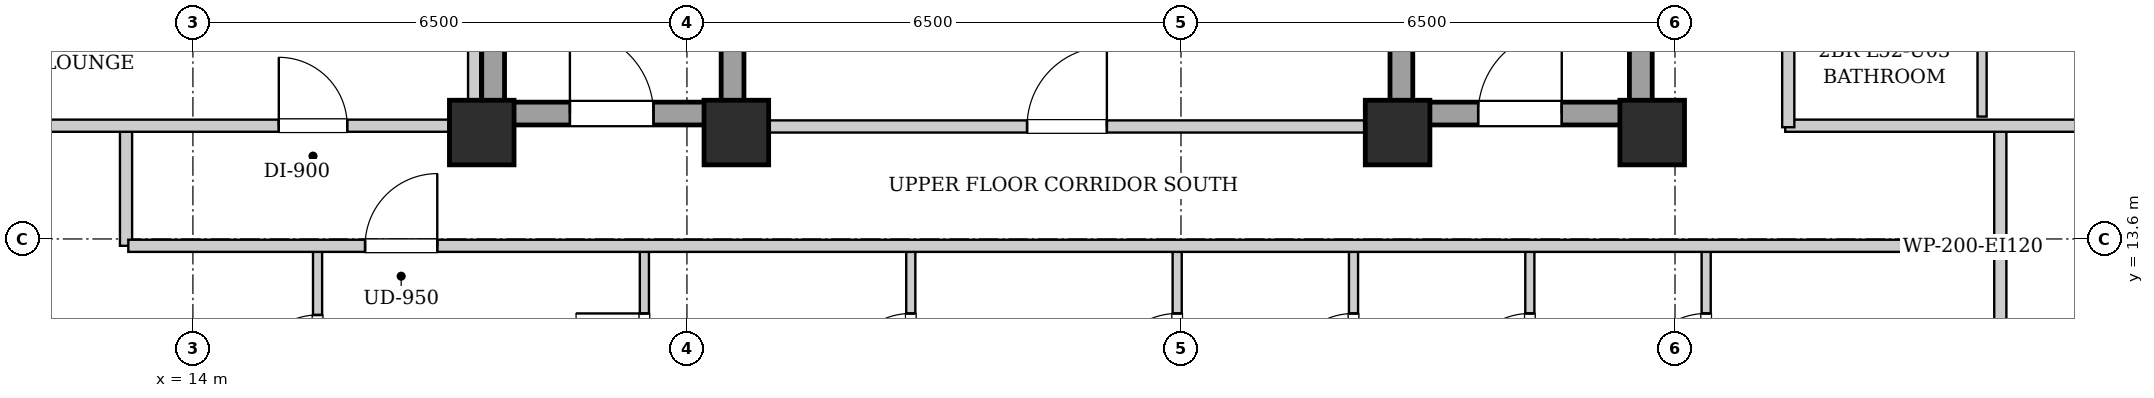
"""IFC4 building model, lengths in metres.
Left out: names, types, materials, properties, quantities, classifications, styles, units other than length and angle.
Written with IfcOpenShell. Run it as: python <this file> out.ifc"""

import sys

from ifc_helpers import new_model, si_unit, direction, frame, frame_2d, origin, origin_2d, place, context, subcontext, project, spatial, rectangle, extrude, element, fill, save


model = new_model("IFC4")
c1 = context("Model", 3, precision=1e-05, world=origin(), true_north=direction((0.0, 1.0)))
c2 = subcontext(c1, "Body", "Model", "MODEL_VIEW")
j1 = project(units=[si_unit("LENGTHUNIT", "METRE"), si_unit("PLANEANGLEUNIT", "RADIAN")], contexts=[c1])
p1 = place(None, origin())
s1 = spatial("IfcSite", under=j1, at=p1, CompositionType="ELEMENT")
p2 = place(p1, origin())
s2 = spatial("IfcBuilding", under=s1, at=p2, CompositionType="ELEMENT")
p3 = place(p2, frame((0.0, 0.0, 181.0)))
s3 = spatial("IfcBuildingStorey", under=s2, at=p3, CompositionType="ELEMENT", Elevation=181.0)
for number, where, z_axis, x_axis in (
    (1, (17.8, 15.0, 0.0), (0.0, 0.0, 1.0), (1.0, 0.0, 0.0)),
    (2, (21.15, 15.0, 0.0), (0.0, 0.0, 1.0), (1.0, 0.0, 0.0)),
    (3, (29.85, 15.0, 0.0), (0.0, 0.0, 1.0), (1.0, 0.0, 0.0)),
    (4, (33.2, 15.0, 0.0), (0.0, 0.0, 1.0), (1.0, 0.0, 0.0)),
):
    element("IfcColumn", number, at=place(p3, frame(where, z_axis=z_axis, x_axis=x_axis)), inside=s3, PredefinedType="COLUMN", context=c2, shape_type="SweptSolid", body=[
        extrude(rectangle(XDim=0.85, YDim=0.85, at=origin_2d()), origin(), (0.0, 0.0, 1.0), 3.3),
    ])
for number, where, z_axis, x_axis in (
    (5, (17.95, 15.1, 0.0), (0.0, 0.0, 1.0), (0.0, 1.0, 0.0)),
    (6, (21.1, 15.1, 0.0), (0.0, 0.0, 1.0), (0.0, 1.0, 0.0)),
):
    element("IfcWall", number, at=place(p3, frame(where, z_axis=z_axis, x_axis=x_axis)), inside=s3, PredefinedType="SHEAR", context=c2, shape_type="SweptSolid", body=[
        extrude(rectangle(XDim=9.0, YDim=0.3, at=frame_2d((4.5, 0.0))), origin(), (0.0, 0.0, 1.0), 3.04),
    ])
p4 = place(p3, frame((18.1, 15.25, 0.0), z_axis=(0.0, 0.0, 1.0), x_axis=(1.0, 0.0, 0.0)))
e7 = element("IfcWall", 7, at=p4, inside=s3, PredefinedType="SHEAR", context=c2, shape_type="SweptSolid", body=[
    extrude(rectangle(XDim=2.85, YDim=0.3, at=frame_2d((1.425, 0.0))), origin(), (0.0, 0.0, 1.0), 3.04),
])
p5 = place(p4, frame((0.86, 0.0, 0.0)))
e8 = element("IfcOpeningElement", 8, at=p5, cuts=e7, PredefinedType="OPENING", context=c2, shape_type="SweptSolid", body=[
    extrude(rectangle(XDim=1.1, YDim=2.05, at=frame_2d((0.55, 1.025))), frame((0.0, 0.16, 0.0), z_axis=(0.0, -1.0, 0.0), x_axis=(1.0, 0.0, 0.0)), (0.0, 0.0, 1.0), 0.32),
])
for number, where, z_axis, x_axis in (
    (9, (29.9, 15.1, 0.0), (0.0, 0.0, 1.0), (0.0, 1.0, 0.0)),
    (10, (33.05, 15.1, 0.0), (0.0, 0.0, 1.0), (0.0, 1.0, 0.0)),
):
    element("IfcWall", number, at=place(p3, frame(where, z_axis=z_axis, x_axis=x_axis)), inside=s3, PredefinedType="SHEAR", context=c2, shape_type="SweptSolid", body=[
        extrude(rectangle(XDim=9.0, YDim=0.3, at=frame_2d((4.5, 0.0))), origin(), (0.0, 0.0, 1.0), 3.04),
    ])
p6 = place(p3, frame((30.05, 15.25, 0.0), z_axis=(0.0, 0.0, 1.0), x_axis=(1.0, 0.0, 0.0)))
e11 = element("IfcWall", 11, at=p6, inside=s3, PredefinedType="SHEAR", context=c2, shape_type="SweptSolid", body=[
    extrude(rectangle(XDim=2.85, YDim=0.3, at=frame_2d((1.425, 0.0))), origin(), (0.0, 0.0, 1.0), 3.04),
])
p7 = place(p6, frame((0.86, 0.0, 0.0)))
e12 = element("IfcOpeningElement", 12, at=p7, cuts=e11, PredefinedType="OPENING", context=c2, shape_type="SweptSolid", body=[
    extrude(rectangle(XDim=1.1, YDim=2.05, at=frame_2d((0.55, 1.025))), frame((0.0, 0.16, 0.0), z_axis=(0.0, -1.0, 0.0), x_axis=(1.0, 0.0, 0.0)), (0.0, 0.0, 1.0), 0.32),
])
p8 = place(p3, frame((21.25, 15.08, 0.0), z_axis=(0.0, 0.0, 1.0), x_axis=(1.0, 0.0, 0.0)))
e13 = element("IfcWall", 13, at=p8, inside=s3, PredefinedType="PARTITIONING", context=c2, shape_type="SweptSolid", body=[
    extrude(rectangle(XDim=8.5, YDim=0.16, at=frame_2d((4.25, 0.0))), origin(), (0.0, 0.0, 1.0), 2.556),
])
p9 = place(p8, frame((3.725, 0.0, 0.0)))
e14 = element("IfcOpeningElement", 14, at=p9, cuts=e13, PredefinedType="OPENING", context=c2, shape_type="SweptSolid", body=[
    extrude(rectangle(XDim=1.05, YDim=2.05, at=frame_2d((0.525, 1.025))), frame((0.0, 0.09, 0.0), z_axis=(0.0, -1.0, 0.0), x_axis=(1.0, 0.0, 0.0)), (0.0, 0.0, 1.0), 0.18),
])
for number, where, z_axis, x_axis in (
    (15, (13.12, 13.51, 0.0), (0.0, 0.0, 1.0), (0.0, 1.0, 0.0)),
    (16, (37.78, 13.51, 0.0), (0.0, 0.0, 1.0), (0.0, 1.0, 0.0)),
):
    element("IfcWall", number, at=place(p3, frame(where, z_axis=z_axis, x_axis=x_axis)), inside=s3, PredefinedType="PARTITIONING", context=c2, shape_type="SweptSolid", body=[
        extrude(rectangle(XDim=1.58, YDim=0.16, at=frame_2d((0.79, 0.0))), origin(), (0.0, 0.0, 1.0), 3.04),
    ])
p10 = place(p3, frame((10.88, 15.09, 0.0), z_axis=(0.0, 0.0, 1.0), x_axis=(1.0, 0.0, 0.0)))
e17 = element("IfcWall", 17, at=p10, inside=s3, PredefinedType="PARTITIONING", context=c2, shape_type="SweptSolid", body=[
    extrude(rectangle(XDim=6.88, YDim=0.16, at=frame_2d((3.44, 0.0))), origin(), (0.0, 0.0, 1.0), 2.556),
])
p11 = place(p10, frame((4.25, 0.0, 0.0)))
e18 = element("IfcOpeningElement", 18, at=p11, cuts=e17, PredefinedType="OPENING", context=c2, shape_type="SweptSolid", body=[
    extrude(rectangle(XDim=0.9, YDim=2.05, at=frame_2d((0.45, 1.025))), frame((0.0, 0.09, 0.0), z_axis=(0.0, -1.0, 0.0), x_axis=(1.0, 0.0, 0.0)), (0.0, 0.0, 1.0), 0.18),
])
p12 = place(p3, frame((34.95, 15.09, 0.0), z_axis=(0.0, 0.0, 1.0), x_axis=(1.0, 0.0, 0.0)))
e19 = element("IfcWall", 19, at=p12, inside=s3, PredefinedType="PARTITIONING", context=c2, shape_type="SweptSolid", body=[
    extrude(rectangle(XDim=5.07, YDim=0.16, at=frame_2d((2.535, 0.0))), origin(), (0.0, 0.0, 1.0), 2.556),
])
p13 = place(p3, frame((37.78, 10.81, 0.0), z_axis=(0.0, 0.0, 1.0), x_axis=(0.0, 1.0, 0.0)))
e20 = element("IfcWall", 20, at=p13, inside=s3, PredefinedType="PARTITIONING", context=c2, shape_type="SweptSolid", body=[
    extrude(rectangle(XDim=2.66, YDim=0.16, at=frame_2d((1.33, 0.0))), origin(), (0.0, 0.0, 1.0), 3.04),
])
p14 = place(p3, frame((15.64, 10.87, 0.0), z_axis=(0.0, 0.0, 1.0), x_axis=(0.0, 1.0, 0.0)))
e21 = element("IfcWall", 21, at=p14, inside=s3, PredefinedType="PARTITIONING", context=c2, shape_type="SweptSolid", body=[
    extrude(rectangle(XDim=2.6, YDim=0.12, at=frame_2d((1.3, 0.0))), origin(), (0.0, 0.0, 1.0), 3.04),
])
p15 = place(p14, frame((0.87, 0.0, 0.0)))
e22 = element("IfcOpeningElement", 22, at=p15, cuts=e21, PredefinedType="OPENING", context=c2, shape_type="SweptSolid", body=[
    extrude(rectangle(XDim=0.86, YDim=2.05, at=frame_2d((0.43, 1.025))), frame((0.0, 0.07, 0.0), z_axis=(0.0, -1.0, 0.0), x_axis=(1.0, 0.0, 0.0)), (0.0, 0.0, 1.0), 0.14),
])
p16 = place(p3, frame((19.94, 10.87, 0.0), z_axis=(0.0, 0.0, 1.0), x_axis=(0.0, 1.0, 0.0)))
e23 = element("IfcWall", 23, at=p16, inside=s3, PredefinedType="PARTITIONING", context=c2, shape_type="SweptSolid", body=[
    extrude(rectangle(XDim=2.6, YDim=0.12, at=frame_2d((1.3, 0.0))), origin(), (0.0, 0.0, 1.0), 3.04),
])
p17 = place(p16, frame((0.85, 0.0, 0.0)))
e24 = element("IfcOpeningElement", 24, at=p17, cuts=e23, PredefinedType="OPENING", context=c2, shape_type="SweptSolid", body=[
    extrude(rectangle(XDim=0.9, YDim=2.05, at=frame_2d((0.45, 1.025))), frame((0.0, 0.07, 0.0), z_axis=(0.0, -1.0, 0.0), x_axis=(1.0, 0.0, 0.0)), (0.0, 0.0, 1.0), 0.14),
])
p18 = place(p3, frame((23.445, 10.87, 0.0), z_axis=(0.0, 0.0, 1.0), x_axis=(0.0, 1.0, 0.0)))
e25 = element("IfcWall", 25, at=p18, inside=s3, PredefinedType="PARTITIONING", context=c2, shape_type="SweptSolid", body=[
    extrude(rectangle(XDim=2.6, YDim=0.12, at=frame_2d((1.3, 0.0))), origin(), (0.0, 0.0, 1.0), 3.04),
])
p19 = place(p18, frame((0.85, 0.0, 0.0)))
e26 = element("IfcOpeningElement", 26, at=p19, cuts=e25, PredefinedType="OPENING", context=c2, shape_type="SweptSolid", body=[
    extrude(rectangle(XDim=0.9, YDim=2.05, at=frame_2d((0.45, 1.025))), frame((0.0, 0.07, 0.0), z_axis=(0.0, -1.0, 0.0), x_axis=(1.0, 0.0, 0.0)), (0.0, 0.0, 1.0), 0.14),
])
p20 = place(p3, frame((26.95, 10.87, 0.0), z_axis=(0.0, 0.0, 1.0), x_axis=(0.0, 1.0, 0.0)))
e27 = element("IfcWall", 27, at=p20, inside=s3, PredefinedType="PARTITIONING", context=c2, shape_type="SweptSolid", body=[
    extrude(rectangle(XDim=2.6, YDim=0.12, at=frame_2d((1.3, 0.0))), origin(), (0.0, 0.0, 1.0), 3.04),
])
p21 = place(p20, frame((0.85, 0.0, 0.0)))
e28 = element("IfcOpeningElement", 28, at=p21, cuts=e27, PredefinedType="OPENING", context=c2, shape_type="SweptSolid", body=[
    extrude(rectangle(XDim=0.9, YDim=2.05, at=frame_2d((0.45, 1.025))), frame((0.0, 0.07, 0.0), z_axis=(0.0, -1.0, 0.0), x_axis=(1.0, 0.0, 0.0)), (0.0, 0.0, 1.0), 0.14),
])
p22 = place(p3, frame((29.27, 10.87, 0.0), z_axis=(0.0, 0.0, 1.0), x_axis=(0.0, 1.0, 0.0)))
e29 = element("IfcWall", 29, at=p22, inside=s3, PredefinedType="PARTITIONING", context=c2, shape_type="SweptSolid", body=[
    extrude(rectangle(XDim=2.6, YDim=0.12, at=frame_2d((1.3, 0.0))), origin(), (0.0, 0.0, 1.0), 3.04),
])
p23 = place(p22, frame((0.85, 0.0, 0.0)))
e30 = element("IfcOpeningElement", 30, at=p23, cuts=e29, PredefinedType="OPENING", context=c2, shape_type="SweptSolid", body=[
    extrude(rectangle(XDim=0.9, YDim=2.05, at=frame_2d((0.45, 1.025))), frame((0.0, 0.07, 0.0), z_axis=(0.0, -1.0, 0.0), x_axis=(1.0, 0.0, 0.0)), (0.0, 0.0, 1.0), 0.14),
])
p24 = place(p3, frame((31.59, 10.87, 0.0), z_axis=(0.0, 0.0, 1.0), x_axis=(0.0, 1.0, 0.0)))
e31 = element("IfcWall", 31, at=p24, inside=s3, PredefinedType="PARTITIONING", context=c2, shape_type="SweptSolid", body=[
    extrude(rectangle(XDim=2.6, YDim=0.12, at=frame_2d((1.3, 0.0))), origin(), (0.0, 0.0, 1.0), 3.04),
])
p25 = place(p24, frame((0.85, 0.0, 0.0)))
e32 = element("IfcOpeningElement", 32, at=p25, cuts=e31, PredefinedType="OPENING", context=c2, shape_type="SweptSolid", body=[
    extrude(rectangle(XDim=0.9, YDim=2.05, at=frame_2d((0.45, 1.025))), frame((0.0, 0.07, 0.0), z_axis=(0.0, -1.0, 0.0), x_axis=(1.0, 0.0, 0.0)), (0.0, 0.0, 1.0), 0.14),
])
p26 = place(p3, frame((33.91, 10.87, 0.0), z_axis=(0.0, 0.0, 1.0), x_axis=(0.0, 1.0, 0.0)))
e33 = element("IfcWall", 33, at=p26, inside=s3, PredefinedType="PARTITIONING", context=c2, shape_type="SweptSolid", body=[
    extrude(rectangle(XDim=2.6, YDim=0.12, at=frame_2d((1.3, 0.0))), origin(), (0.0, 0.0, 1.0), 3.04),
])
p27 = place(p26, frame((0.85, 0.0, 0.0)))
e34 = element("IfcOpeningElement", 34, at=p27, cuts=e33, PredefinedType="OPENING", context=c2, shape_type="SweptSolid", body=[
    extrude(rectangle(XDim=0.9, YDim=2.05, at=frame_2d((0.45, 1.025))), frame((0.0, 0.07, 0.0), z_axis=(0.0, -1.0, 0.0), x_axis=(1.0, 0.0, 0.0)), (0.0, 0.0, 1.0), 0.14),
])
p28 = place(p3, frame((37.54, 15.21, 0.0), z_axis=(0.0, 0.0, 1.0), x_axis=(0.0, 1.0, 0.0)))
e35 = element("IfcWall", 35, at=p28, inside=s3, PredefinedType="PARTITIONING", context=c2, shape_type="SweptSolid", body=[
    extrude(rectangle(XDim=2.3, YDim=0.12, at=frame_2d((1.15, 0.0))), origin(), (0.0, 0.0, 1.0), 3.04),
])
p29 = place(p3, frame((13.15, 13.51, 0.0), z_axis=(0.0, 0.0, 1.0), x_axis=(1.0, 0.0, 0.0)))
e36 = element("IfcWall", 36, at=p29, inside=s3, PredefinedType="PARTITIONING", context=c2, shape_type="SweptSolid", body=[
    extrude(rectangle(XDim=24.6, YDim=0.16, at=frame_2d((12.3, 0.0))), origin(), (0.0, 0.0, 1.0), 3.04),
])
p30 = place(p29, frame((3.115, 0.0, 0.0)))
e37 = element("IfcOpeningElement", 37, at=p30, cuts=e36, PredefinedType="OPENING", context=c2, shape_type="SweptSolid", body=[
    extrude(rectangle(XDim=0.95, YDim=2.1, at=frame_2d((0.475, 1.05))), frame((0.0, 0.09, 0.0), z_axis=(0.0, -1.0, 0.0), x_axis=(1.0, 0.0, 0.0)), (0.0, 0.0, 1.0), 0.18),
])
p31 = place(p3, frame((17.7, 15.02, 0.0), z_axis=(0.0, 0.0, 1.0), x_axis=(0.0, 1.0, 0.0)))
e38 = element("IfcWall", 38, at=p31, inside=s3, PredefinedType="PARTITIONING", context=c2, shape_type="SweptSolid", body=[
    extrude(rectangle(XDim=13.98, YDim=0.16, at=frame_2d((6.99, 0.0))), origin(), (0.0, 0.0, 1.0), 3.04),
])
p32 = place(p3, frame((34.99, 15.07, 0.0), z_axis=(0.0, 0.0, 1.0), x_axis=(0.0, 1.0, 0.0)))
e39 = element("IfcWall", 39, at=p32, inside=s3, PredefinedType="PARTITIONING", context=c2, shape_type="SweptSolid", body=[
    extrude(rectangle(XDim=13.93, YDim=0.16, at=frame_2d((6.965, 0.0))), origin(), (0.0, 0.0, 1.0), 3.04),
])
p33 = place(p32, frame((4.385, 0.0, 0.0)))
e40 = element("IfcOpeningElement", 40, at=p33, cuts=e39, PredefinedType="OPENING", context=c2, shape_type="SweptSolid", body=[
    extrude(rectangle(XDim=0.95, YDim=2.1, at=frame_2d((0.475, 1.05))), frame((0.0, 0.09, 0.0), z_axis=(0.0, -1.0, 0.0), x_axis=(1.0, 0.0, 0.0)), (0.0, 0.0, 1.0), 0.18),
])
p34 = place(p5, origin())
e41 = element("IfcDoor", 41, at=p34, inside=s3, OperationType="SINGLE_SWING_LEFT", PredefinedType="DOOR", context=c2, shape_type="SweptSolid", body=[
    extrude(rectangle(XDim=1.1, YDim=2.05, at=frame_2d((0.55, 1.025))), frame((0.0, 0.025, 0.0), z_axis=(0.0, -1.0, 0.0), x_axis=(1.0, 0.0, 0.0)), (0.0, 0.0, 1.0), 0.05),
])
fill(e8, e41)
p35 = place(p7, origin())
e42 = element("IfcDoor", 42, at=p35, inside=s3, OperationType="SINGLE_SWING_RIGHT", PredefinedType="DOOR", context=c2, shape_type="SweptSolid", body=[
    extrude(rectangle(XDim=1.1, YDim=2.05, at=frame_2d((0.55, 1.025))), frame((0.0, 0.025, 0.0), z_axis=(0.0, -1.0, 0.0), x_axis=(1.0, 0.0, 0.0)), (0.0, 0.0, 1.0), 0.05),
])
fill(e12, e42)
p36 = place(p9, origin())
e43 = element("IfcDoor", 43, at=p36, inside=s3, OperationType="SINGLE_SWING_RIGHT", PredefinedType="DOOR", context=c2, shape_type="SweptSolid", body=[
    extrude(rectangle(XDim=1.05, YDim=2.05, at=frame_2d((0.525, 1.025))), frame((0.0, 0.025, 0.0), z_axis=(0.0, -1.0, 0.0), x_axis=(1.0, 0.0, 0.0)), (0.0, 0.0, 1.0), 0.05),
])
fill(e14, e43)
p37 = place(p11, origin())
e44 = element("IfcDoor", 44, at=p37, inside=s3, OperationType="SINGLE_SWING_LEFT", PredefinedType="DOOR", context=c2, shape_type="SweptSolid", body=[
    extrude(rectangle(XDim=0.9, YDim=2.05, at=frame_2d((0.45, 1.025))), frame((0.0, 0.025, 0.0), z_axis=(0.0, -1.0, 0.0), x_axis=(1.0, 0.0, 0.0)), (0.0, 0.0, 1.0), 0.05),
])
fill(e18, e44)
p38 = place(p15, origin())
e45 = element("IfcDoor", 45, at=p38, inside=s3, OperationType="SINGLE_SWING_LEFT", PredefinedType="DOOR", context=c2, shape_type="SweptSolid", body=[
    extrude(rectangle(XDim=0.86, YDim=2.05, at=frame_2d((0.43, 1.025))), frame((0.0, 0.025, 0.0), z_axis=(0.0, -1.0, 0.0), x_axis=(1.0, 0.0, 0.0)), (0.0, 0.0, 1.0), 0.05),
])
fill(e22, e45)
p39 = place(p17, origin())
e46 = element("IfcDoor", 46, at=p39, inside=s3, OperationType="SINGLE_SWING_RIGHT", PredefinedType="DOOR", context=c2, shape_type="SweptSolid", body=[
    extrude(rectangle(XDim=0.9, YDim=2.05, at=frame_2d((0.45, 1.025))), frame((0.0, 0.025, 0.0), z_axis=(0.0, -1.0, 0.0), x_axis=(1.0, 0.0, 0.0)), (0.0, 0.0, 1.0), 0.05),
])
fill(e24, e46)
p40 = place(p19, origin())
e47 = element("IfcDoor", 47, at=p40, inside=s3, OperationType="SINGLE_SWING_LEFT", PredefinedType="DOOR", context=c2, shape_type="SweptSolid", body=[
    extrude(rectangle(XDim=0.9, YDim=2.05, at=frame_2d((0.45, 1.025))), frame((0.0, 0.025, 0.0), z_axis=(0.0, -1.0, 0.0), x_axis=(1.0, 0.0, 0.0)), (0.0, 0.0, 1.0), 0.05),
])
fill(e26, e47)
p41 = place(p21, origin())
e48 = element("IfcDoor", 48, at=p41, inside=s3, OperationType="SINGLE_SWING_LEFT", PredefinedType="DOOR", context=c2, shape_type="SweptSolid", body=[
    extrude(rectangle(XDim=0.9, YDim=2.05, at=frame_2d((0.45, 1.025))), frame((0.0, 0.025, 0.0), z_axis=(0.0, -1.0, 0.0), x_axis=(1.0, 0.0, 0.0)), (0.0, 0.0, 1.0), 0.05),
])
fill(e28, e48)
p42 = place(p23, origin())
e49 = element("IfcDoor", 49, at=p42, inside=s3, OperationType="SINGLE_SWING_LEFT", PredefinedType="DOOR", context=c2, shape_type="SweptSolid", body=[
    extrude(rectangle(XDim=0.9, YDim=2.05, at=frame_2d((0.45, 1.025))), frame((0.0, 0.025, 0.0), z_axis=(0.0, -1.0, 0.0), x_axis=(1.0, 0.0, 0.0)), (0.0, 0.0, 1.0), 0.05),
])
fill(e30, e49)
p43 = place(p25, origin())
e50 = element("IfcDoor", 50, at=p43, inside=s3, OperationType="SINGLE_SWING_LEFT", PredefinedType="DOOR", context=c2, shape_type="SweptSolid", body=[
    extrude(rectangle(XDim=0.9, YDim=2.05, at=frame_2d((0.45, 1.025))), frame((0.0, 0.025, 0.0), z_axis=(0.0, -1.0, 0.0), x_axis=(1.0, 0.0, 0.0)), (0.0, 0.0, 1.0), 0.05),
])
fill(e32, e50)
p44 = place(p27, origin())
e51 = element("IfcDoor", 51, at=p44, inside=s3, OperationType="SINGLE_SWING_LEFT", PredefinedType="DOOR", context=c2, shape_type="SweptSolid", body=[
    extrude(rectangle(XDim=0.9, YDim=2.05, at=frame_2d((0.45, 1.025))), frame((0.0, 0.025, 0.0), z_axis=(0.0, -1.0, 0.0), x_axis=(1.0, 0.0, 0.0)), (0.0, 0.0, 1.0), 0.05),
])
fill(e34, e51)
p45 = place(p30, origin())
e52 = element("IfcDoor", 52, at=p45, inside=s3, OperationType="SINGLE_SWING_RIGHT", PredefinedType="DOOR", context=c2, shape_type="SweptSolid", body=[
    extrude(rectangle(XDim=0.95, YDim=2.1, at=frame_2d((0.475, 1.05))), frame((0.0, 0.025, 0.0), z_axis=(0.0, -1.0, 0.0), x_axis=(1.0, 0.0, 0.0)), (0.0, 0.0, 1.0), 0.05),
])
fill(e37, e52)
save(model, sys.argv[1])
